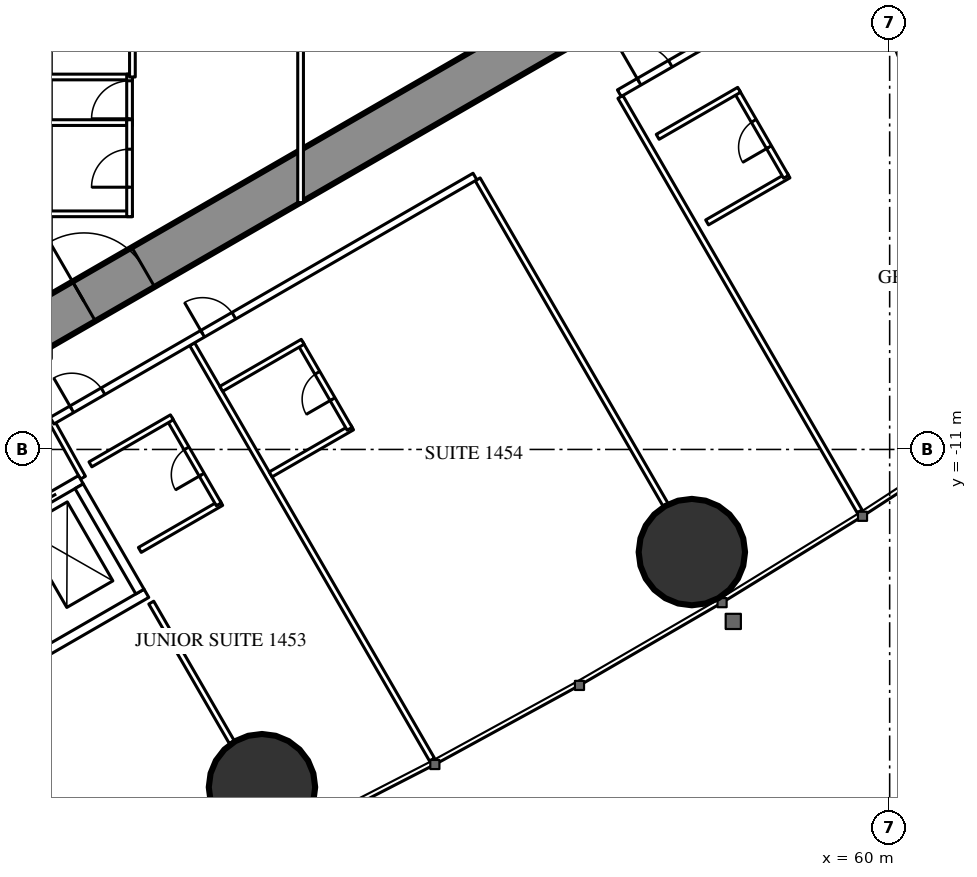
"""IFC4 building model, lengths in metres.
Left out: names, types, materials, properties, quantities, classifications, styles, units other than length and angle.
Written with IfcOpenShell. Run it as: python <this file> out.ifc"""

import sys

from ifc_helpers import new_model, si_unit, direction, frame, frame_2d, origin, origin_2d, place, context, subcontext, project, spatial, rectangle, hollow_circle, extrude, element, fill, save


model = new_model("IFC4")
c1 = context("Model", 3, precision=1e-05, world=origin(), true_north=direction((0.0, 1.0)))
c2 = subcontext(c1, "Body", "Model", "MODEL_VIEW")
j1 = project(units=[si_unit("LENGTHUNIT", "METRE"), si_unit("PLANEANGLEUNIT", "RADIAN")], contexts=[c1])
p1 = place(None, origin())
s1 = spatial("IfcSite", under=j1, at=p1, CompositionType="ELEMENT")
p2 = place(p1, origin())
s2 = spatial("IfcBuilding", under=s1, at=p2, CompositionType="ELEMENT")
p3 = place(p2, frame((0.0, 0.0, 56.5)))
s3 = spatial("IfcBuildingStorey", under=s2, at=p3, CompositionType="ELEMENT", Elevation=56.5)
for number, where, z_axis, x_axis in (
    (1, (43.484, -19.886, 0.0), (0.0, 0.0, 1.0), (1.0, 0.0, 0.0)),
    (2, (54.795, -13.701, 0.0), (0.0, 0.0, 1.0), (1.0, 0.0, 0.0)),
):
    element("IfcColumn", number, at=place(p3, frame(where, z_axis=z_axis, x_axis=x_axis)), inside=s3, PredefinedType="COLUMN", context=c2, shape_type="SweptSolid", body=[
        extrude(hollow_circle(Radius=1.4, WallThickness=0.12, at=origin_2d()), origin(), (0.0, 0.0, 1.0), 3.5),
    ])
p4 = place(p3, frame((61.5, 0.0, 0.0), z_axis=(0.0, 0.0, 1.0), x_axis=(1.0, 0.0, 0.0)))
e3 = element("IfcColumn", 3, at=p4, inside=s3, PredefinedType="COLUMN", context=c2, shape_type="SweptSolid", body=[
    extrude(hollow_circle(Radius=1.4, WallThickness=0.1, at=origin_2d()), origin(), (0.0, 0.0, 1.0), 3.5),
])
p5 = place(p3, frame((27.2, -13.8, 0.0), z_axis=(0.0, 0.0, 1.0), x_axis=(0.866027159892, 0.499996958321, 0.0)))
e4 = element("IfcWall", 4, at=p5, inside=s3, PredefinedType="SHEAR", context=c2, shape_type="SweptSolid", body=[
    extrude(rectangle(XDim=27.947, YDim=1.2, at=frame_2d((13.973, 0.0))), origin(), (0.0, 0.0, 1.0), 3.5),
])
p6 = place(p5, frame((4.6, 0.0, 0.0)))
e5 = element("IfcOpeningElement", 5, at=p6, cuts=e4, PredefinedType="OPENING", context=c2, shape_type="SweptSolid", body=[
    extrude(rectangle(XDim=1.0, YDim=2.2, at=frame_2d((0.5, 1.1))), frame((0.0, 0.61, 0.0), z_axis=(0.0, -1.0, 0.0), x_axis=(1.0, 0.0, 0.0)), (0.0, 0.0, 1.0), 1.22),
])
p7 = place(p5, frame((13.395, 0.0, 0.0)))
e6 = element("IfcOpeningElement", 6, at=p7, cuts=e4, PredefinedType="OPENING", context=c2, shape_type="SweptSolid", body=[
    extrude(rectangle(XDim=1.8, YDim=2.2, at=frame_2d((0.9, 1.1))), frame((0.0, 0.61, 0.0), z_axis=(0.0, -1.0, 0.0), x_axis=(1.0, 0.0, 0.0)), (0.0, 0.0, 1.0), 1.22),
])
p8 = place(p3, frame((41.647, -8.23, 0.0), z_axis=(0.0, 0.0, 1.0), x_axis=(0.49998590462, -0.866033541603, 0.0)))
e7 = element("IfcWall", 7, at=p8, inside=s3, PredefinedType="PARTITIONING", context=c2, shape_type="SweptSolid", body=[
    extrude(rectangle(XDim=12.621, YDim=0.15, at=frame_2d((6.311, 0.0))), origin(), (0.0, 0.0, 1.0), 3.25),
])
p9 = place(p3, frame((49.159, -3.893, 0.0), z_axis=(0.0, 0.0, 1.0), x_axis=(0.499998773722, -0.866026111775, 0.0)))
e8 = element("IfcWall", 8, at=p9, inside=s3, PredefinedType="PARTITIONING", context=c2, shape_type="SweptSolid", body=[
    extrude(rectangle(XDim=9.892, YDim=0.15, at=frame_2d((4.946, 0.0))), origin(), (0.0, 0.0, 1.0), 2.25),
])
p10 = place(p3, frame((52.915, -1.725, 0.0), z_axis=(0.0, 0.0, 1.0), x_axis=(0.499997163113, -0.866027041656, 0.0)))
e9 = element("IfcWall", 9, at=p10, inside=s3, PredefinedType="PARTITIONING", context=c2, shape_type="SweptSolid", body=[
    extrude(rectangle(XDim=12.591, YDim=0.15, at=frame_2d((6.295, 0.0))), origin(), (0.0, 0.0, 1.0), 3.25),
])
p11 = place(p3, frame((40.57, -15.03, 0.0), z_axis=(0.0, 0.0, 1.0), x_axis=(0.500012993597, -0.866017901798, 0.0)))
e10 = element("IfcWall", 10, at=p11, inside=s3, PredefinedType="PARTITIONING", context=c2, shape_type="SweptSolid", body=[
    extrude(rectangle(XDim=4.243, YDim=0.15, at=frame_2d((2.122, 0.0))), origin(), (0.0, 0.0, 1.0), 3.25),
])
p12 = place(p3, frame((38.773, -11.742, 0.0), z_axis=(0.0, 0.0, 1.0), x_axis=(-0.485528096672, 0.8742210632, 0.0)))
e11 = element("IfcWall", 11, at=p12, inside=s3, PredefinedType="PARTITIONING", context=c2, shape_type="SweptSolid", body=[
    extrude(rectangle(XDim=1.805, YDim=0.15, at=frame_2d((0.903, 0.0))), origin(), (0.0, 0.0, 1.0), 3.25),
])
p13 = place(p3, frame((37.96, -10.243, 0.0), z_axis=(0.0, 0.0, 1.0), x_axis=(0.866030548046, 0.499991089772, 0.0)))
e12 = element("IfcWall", 12, at=p13, inside=s3, PredefinedType="PARTITIONING", context=c2, shape_type="SweptSolid", body=[
    extrude(rectangle(XDim=12.849, YDim=0.2, at=frame_2d((6.425, 0.0))), origin(), (0.0, 0.0, 1.0), 3.25),
])
p14 = place(p13, frame((4.575, 0.0, 0.0)))
e13 = element("IfcOpeningElement", 13, at=p14, cuts=e12, PredefinedType="OPENING", context=c2, shape_type="SweptSolid", body=[
    extrude(rectangle(XDim=0.95, YDim=2.2, at=frame_2d((0.475, 1.1))), frame((0.0, 0.11, 0.0), z_axis=(0.0, -1.0, 0.0), x_axis=(1.0, 0.0, 0.0)), (0.0, 0.0, 1.0), 0.22),
])
p15 = place(p13, frame((0.6, 0.0, 0.0)))
e14 = element("IfcOpeningElement", 14, at=p15, cuts=e12, PredefinedType="OPENING", context=c2, shape_type="SweptSolid", body=[
    extrude(rectangle(XDim=0.95, YDim=2.2, at=frame_2d((0.475, 1.1))), frame((0.0, 0.11, 0.0), z_axis=(0.0, -1.0, 0.0), x_axis=(1.0, 0.0, 0.0)), (0.0, 0.0, 1.0), 0.22),
])
p16 = place(p3, frame((52.886, -1.626, 0.0), z_axis=(0.0, 0.0, 1.0), x_axis=(0.866030540913, 0.499991102127, 0.0)))
e15 = element("IfcWall", 15, at=p16, inside=s3, PredefinedType="PARTITIONING", context=c2, shape_type="SweptSolid", body=[
    extrude(rectangle(XDim=3.251, YDim=0.2, at=frame_2d((1.626, 0.0))), origin(), (0.0, 0.0, 1.0), 3.25),
])
p17 = place(p16, frame((0.6, 0.0, 0.0)))
e16 = element("IfcOpeningElement", 16, at=p17, cuts=e15, PredefinedType="OPENING", context=c2, shape_type="SweptSolid", body=[
    extrude(rectangle(XDim=0.95, YDim=2.2, at=frame_2d((0.475, 1.1))), frame((0.0, 0.11, 0.0), z_axis=(0.0, -1.0, 0.0), x_axis=(1.0, 0.0, 0.0)), (0.0, 0.0, 1.0), 0.22),
])
p18 = place(p3, frame((43.712, -11.657, 0.0), z_axis=(0.0, 0.0, 1.0), x_axis=(0.866006523861, 0.500032699561, 0.0)))
e17 = element("IfcWall", 17, at=p18, inside=s3, PredefinedType="PARTITIONING", context=c2, shape_type="SweptSolid", body=[
    extrude(rectangle(XDim=2.475, YDim=0.15, at=frame_2d((1.237, 0.0))), origin(), (0.0, 0.0, 1.0), 3.25),
])
p19 = place(p3, frame((44.491, -8.205, 0.0), z_axis=(0.0, 0.0, 1.0), x_axis=(0.500047596559, -0.865997922154, 0.0)))
e18 = element("IfcWall", 18, at=p19, inside=s3, PredefinedType="PARTITIONING", context=c2, shape_type="SweptSolid", body=[
    extrude(rectangle(XDim=2.6, YDim=0.15, at=frame_2d((1.3, 0.0))), origin(), (0.0, 0.0, 1.0), 3.25),
])
p20 = place(p19, frame((0.9, 0.0, 0.0)))
e19 = element("IfcOpeningElement", 19, at=p20, cuts=e18, PredefinedType="OPENING", context=c2, shape_type="SweptSolid", body=[
    extrude(rectangle(XDim=0.8, YDim=2.2, at=frame_2d((0.4, 1.1))), frame((0.0, 0.085, 0.0), z_axis=(0.0, -1.0, 0.0), x_axis=(1.0, 0.0, 0.0)), (0.0, 0.0, 1.0), 0.17),
])
p21 = place(p3, frame((42.412, -9.405, 0.0), z_axis=(0.0, 0.0, 1.0), x_axis=(0.866006523861, 0.500032699561, 0.0)))
e20 = element("IfcWall", 20, at=p21, inside=s3, PredefinedType="PARTITIONING", context=c2, shape_type="SweptSolid", body=[
    extrude(rectangle(XDim=2.475, YDim=0.15, at=frame_2d((1.237, 0.0))), origin(), (0.0, 0.0, 1.0), 3.25),
])
p22 = place(p3, frame((55.196, -5.026, 0.0), z_axis=(0.0, 0.0, 1.0), x_axis=(0.866073894602, 0.499916002032, 0.0)))
e21 = element("IfcWall", 21, at=p22, inside=s3, PredefinedType="PARTITIONING", context=c2, shape_type="SweptSolid", body=[
    extrude(rectangle(XDim=2.475, YDim=0.15, at=frame_2d((1.238, 0.0))), origin(), (0.0, 0.0, 1.0), 3.25),
])
p23 = place(p3, frame((55.975, -1.575, 0.0), z_axis=(0.0, 0.0, 1.0), x_axis=(0.500006934395, -0.866021400173, 0.0)))
e22 = element("IfcWall", 22, at=p23, inside=s3, PredefinedType="PARTITIONING", context=c2, shape_type="SweptSolid", body=[
    extrude(rectangle(XDim=2.6, YDim=0.15, at=frame_2d((1.3, 0.0))), origin(), (0.0, 0.0, 1.0), 3.25),
])
p24 = place(p23, frame((0.9, 0.0, 0.0)))
e23 = element("IfcOpeningElement", 23, at=p24, cuts=e22, PredefinedType="OPENING", context=c2, shape_type="SweptSolid", body=[
    extrude(rectangle(XDim=0.8, YDim=2.2, at=frame_2d((0.4, 1.1))), frame((0.0, 0.085, 0.0), z_axis=(0.0, -1.0, 0.0), x_axis=(1.0, 0.0, 0.0)), (0.0, 0.0, 1.0), 0.17),
])
p25 = place(p3, frame((53.896, -2.775, 0.0), z_axis=(0.0, 0.0, 1.0), x_axis=(0.866006523861, 0.500032699561, 0.0)))
e24 = element("IfcWall", 24, at=p25, inside=s3, PredefinedType="PARTITIONING", context=c2, shape_type="SweptSolid", body=[
    extrude(rectangle(XDim=2.475, YDim=0.15, at=frame_2d((1.237, 0.0))), origin(), (0.0, 0.0, 1.0), 3.25),
])
p26 = place(p3, frame((40.27, -13.644, 0.0), z_axis=(0.0, 0.0, 1.0), x_axis=(0.866031185235, 0.4999899861, 0.0)))
e25 = element("IfcWall", 25, at=p26, inside=s3, PredefinedType="PARTITIONING", context=c2, shape_type="SweptSolid", body=[
    extrude(rectangle(XDim=2.475, YDim=0.15, at=frame_2d((1.238, 0.0))), origin(), (0.0, 0.0, 1.0), 3.25),
])
p27 = place(p3, frame((41.048, -10.193, 0.0), z_axis=(0.0, 0.0, 1.0), x_axis=(0.500047596559, -0.865997922154, 0.0)))
e26 = element("IfcWall", 26, at=p27, inside=s3, PredefinedType="PARTITIONING", context=c2, shape_type="SweptSolid", body=[
    extrude(rectangle(XDim=2.6, YDim=0.15, at=frame_2d((1.3, 0.0))), origin(), (0.0, 0.0, 1.0), 3.25),
])
p28 = place(p27, frame((0.9, 0.0, 0.0)))
e27 = element("IfcOpeningElement", 27, at=p28, cuts=e26, PredefinedType="OPENING", context=c2, shape_type="SweptSolid", body=[
    extrude(rectangle(XDim=0.8, YDim=2.2, at=frame_2d((0.4, 1.1))), frame((0.0, 0.085, 0.0), z_axis=(0.0, -1.0, 0.0), x_axis=(1.0, 0.0, 0.0)), (0.0, 0.0, 1.0), 0.17),
])
p29 = place(p3, frame((38.97, -11.393, 0.0), z_axis=(0.0, 0.0, 1.0), x_axis=(0.866031185235, 0.4999899861, 0.0)))
e28 = element("IfcWall", 28, at=p29, inside=s3, PredefinedType="PARTITIONING", context=c2, shape_type="SweptSolid", body=[
    extrude(rectangle(XDim=2.475, YDim=0.15, at=frame_2d((1.238, 0.0))), origin(), (0.0, 0.0, 1.0), 3.25),
])
for number, where, z_axis, x_axis in (
    (29, (37.9, -1.2, 0.0), (0.0, 0.0, 1.0), (1.0, 0.0, 0.0)),
    (30, (37.9, -2.4, 0.0), (0.0, 0.0, 1.0), (1.0, 0.0, 0.0)),
    (31, (37.9, -4.8, 0.0), (0.0, 0.0, 1.0), (1.0, 0.0, 0.0)),
):
    element("IfcWall", number, at=place(p3, frame(where, z_axis=z_axis, x_axis=x_axis)), inside=s3, PredefinedType="PARTITIONING", context=c2, shape_type="SweptSolid", body=[
        extrude(rectangle(XDim=2.175, YDim=0.15, at=frame_2d((1.087, 0.0))), origin(), (0.0, 0.0, 1.0), 3.25),
    ])
p30 = place(p3, frame((40.0, -2.475, 0.0), z_axis=(0.0, 0.0, 1.0), x_axis=(0.0, 1.0, 0.0)))
e32 = element("IfcWall", 32, at=p30, inside=s3, PredefinedType="PARTITIONING", context=c2, shape_type="SweptSolid", body=[
    extrude(rectangle(XDim=1.35, YDim=0.15, at=frame_2d((0.675, 0.0))), origin(), (0.0, 0.0, 1.0), 3.25),
])
p31 = place(p30, frame((0.175, 0.0, 0.0)))
e33 = element("IfcOpeningElement", 33, at=p31, cuts=e32, PredefinedType="OPENING", context=c2, shape_type="SweptSolid", body=[
    extrude(rectangle(XDim=1.0, YDim=2.2, at=frame_2d((0.5, 1.1))), frame((0.0, 0.085, 0.0), z_axis=(0.0, -1.0, 0.0), x_axis=(1.0, 0.0, 0.0)), (0.0, 0.0, 1.0), 0.17),
])
p32 = place(p3, frame((40.0, -4.875, 0.0), z_axis=(0.0, 0.0, 1.0), x_axis=(0.0, 1.0, 0.0)))
e34 = element("IfcWall", 34, at=p32, inside=s3, PredefinedType="PARTITIONING", context=c2, shape_type="SweptSolid", body=[
    extrude(rectangle(XDim=2.55, YDim=0.15, at=frame_2d((1.275, 0.0))), origin(), (0.0, 0.0, 1.0), 3.25),
])
p33 = place(p32, frame((0.775, 0.0, 0.0)))
e35 = element("IfcOpeningElement", 35, at=p33, cuts=e34, PredefinedType="OPENING", context=c2, shape_type="SweptSolid", body=[
    extrude(rectangle(XDim=1.0, YDim=2.2, at=frame_2d((0.5, 1.1))), frame((0.0, 0.085, 0.0), z_axis=(0.0, -1.0, 0.0), x_axis=(1.0, 0.0, 0.0)), (0.0, 0.0, 1.0), 0.17),
])
p34 = place(p3, frame((40.075, -1.2, 0.0), z_axis=(0.0, 0.0, 1.0), x_axis=(0.0, 1.0, 0.0)))
e36 = element("IfcWall", 36, at=p34, inside=s3, PredefinedType="PARTITIONING", context=c2, shape_type="SweptSolid", body=[
    extrude(rectangle(XDim=6.874, YDim=0.15, at=frame_2d((3.437, 0.0))), origin(), (0.0, 0.0, 1.0), 3.25),
])
p35 = place(p34, frame((2.537, 0.0, 0.0)))
e37 = element("IfcOpeningElement", 37, at=p35, cuts=e36, PredefinedType="OPENING", context=c2, shape_type="SweptSolid", body=[
    extrude(rectangle(XDim=1.8, YDim=2.2, at=frame_2d((0.9, 1.1))), frame((0.0, 0.085, 0.0), z_axis=(0.0, -1.0, 0.0), x_axis=(1.0, 0.0, 0.0)), (0.0, 0.0, 1.0), 0.17),
])
p36 = place(p3, frame((44.5, -4.505, 0.0), z_axis=(0.0, 0.0, 1.0), x_axis=(0.0, 1.0, 0.0)))
e38 = element("IfcWall", 38, at=p36, inside=s3, PredefinedType="PARTITIONING", context=c2, shape_type="SweptSolid", body=[
    extrude(rectangle(XDim=9.009, YDim=0.15, at=frame_2d((4.505, 0.0))), origin(), (0.0, 0.0, 1.0), 2.45),
])
p37 = place(p36, frame((4.005, 0.0, 0.0)))
e39 = element("IfcOpeningElement", 39, at=p37, cuts=e38, PredefinedType="OPENING", context=c2, shape_type="SweptSolid", body=[
    extrude(rectangle(XDim=1.0, YDim=2.2, at=frame_2d((0.5, 1.1))), frame((0.0, 0.085, 0.0), z_axis=(0.0, -1.0, 0.0), x_axis=(1.0, 0.0, 0.0)), (0.0, 0.0, 1.0), 0.17),
])
p38 = place(p3, frame((31.271, -16.097, 0.0), z_axis=(0.0, 0.0, 1.0), x_axis=(0.86604045752, 0.499973925258, 0.0)))
e40 = element("IfcWall", 40, at=p38, inside=s3, PredefinedType="PARTITIONING", context=c2, shape_type="SweptSolid", body=[
    extrude(rectangle(XDim=8.6, YDim=0.25, at=frame_2d((4.3, 0.0))), origin(), (0.0, 0.0, 1.0), 3.25),
])
p39 = place(p38, frame((0.75, 0.0, 0.0)))
e41 = element("IfcOpeningElement", 41, at=p39, cuts=e40, PredefinedType="OPENING", context=c2, shape_type="SweptSolid", body=[
    extrude(rectangle(XDim=1.1, YDim=2.2, at=frame_2d((0.55, 1.1))), frame((0.0, 0.135, 0.0), z_axis=(0.0, -1.0, 0.0), x_axis=(1.0, 0.0, 0.0)), (0.0, 0.0, 1.0), 0.27),
])
p40 = place(p38, frame((2.75, 0.0, 0.0)))
e42 = element("IfcOpeningElement", 42, at=p40, cuts=e40, PredefinedType="OPENING", context=c2, shape_type="SweptSolid", body=[
    extrude(rectangle(XDim=1.1, YDim=2.2, at=frame_2d((0.55, 1.1))), frame((0.0, 0.135, 0.0), z_axis=(0.0, -1.0, 0.0), x_axis=(1.0, 0.0, 0.0)), (0.0, 0.0, 1.0), 0.27),
])
p41 = place(p38, frame((4.75, 0.0, 0.0)))
e43 = element("IfcOpeningElement", 43, at=p41, cuts=e40, PredefinedType="OPENING", context=c2, shape_type="SweptSolid", body=[
    extrude(rectangle(XDim=1.1, YDim=2.2, at=frame_2d((0.55, 1.1))), frame((0.0, 0.135, 0.0), z_axis=(0.0, -1.0, 0.0), x_axis=(1.0, 0.0, 0.0)), (0.0, 0.0, 1.0), 0.27),
])
p42 = place(p38, frame((6.75, 0.0, 0.0)))
e44 = element("IfcOpeningElement", 44, at=p42, cuts=e40, PredefinedType="OPENING", context=c2, shape_type="SweptSolid", body=[
    extrude(rectangle(XDim=1.1, YDim=2.2, at=frame_2d((0.55, 1.1))), frame((0.0, 0.135, 0.0), z_axis=(0.0, -1.0, 0.0), x_axis=(1.0, 0.0, 0.0)), (0.0, 0.0, 1.0), 0.27),
])
p43 = place(p3, frame((32.996, -19.086, 0.0), z_axis=(0.0, 0.0, 1.0), x_axis=(0.866028165386, 0.499995216735, 0.0)))
e45 = element("IfcWall", 45, at=p43, inside=s3, PredefinedType="PARTITIONING", context=c2, shape_type="SweptSolid", body=[
    extrude(rectangle(XDim=8.6, YDim=0.25, at=frame_2d((4.3, 0.0))), origin(), (0.0, 0.0, 1.0), 3.25),
])
p44 = place(p3, frame((38.673, -11.968, 0.0), z_axis=(0.0, 0.0, 1.0), x_axis=(0.499929347863, -0.866066190972, 0.0)))
e46 = element("IfcWall", 46, at=p44, inside=s3, PredefinedType="PARTITIONING", context=c2, shape_type="SweptSolid", body=[
    extrude(rectangle(XDim=3.201, YDim=0.25, at=frame_2d((1.6, 0.0))), origin(), (0.0, 0.0, 1.0), 3.25),
])
p45 = place(p20, origin())
e47 = element("IfcDoor", 47, at=p45, inside=s3, OperationType="SINGLE_SWING_RIGHT", PredefinedType="DOOR", context=c2, shape_type="SweptSolid", body=[
    extrude(rectangle(XDim=0.8, YDim=2.2, at=frame_2d((0.4, 1.1))), frame((0.0, 0.025, 0.0), z_axis=(0.0, -1.0, 0.0), x_axis=(1.0, 0.0, 0.0)), (0.0, 0.0, 1.0), 0.05),
])
fill(e19, e47)
p46 = place(p14, origin())
e48 = element("IfcDoor", 48, at=p46, inside=s3, OperationType="SINGLE_SWING_LEFT", PredefinedType="DOOR", context=c2, shape_type="SweptSolid", body=[
    extrude(rectangle(XDim=0.95, YDim=2.2, at=frame_2d((0.475, 1.1))), frame((0.0, 0.025, 0.0), z_axis=(0.0, -1.0, 0.0), x_axis=(1.0, 0.0, 0.0)), (0.0, 0.0, 1.0), 0.05),
])
fill(e13, e48)
p47 = place(p24, origin())
e49 = element("IfcDoor", 49, at=p47, inside=s3, OperationType="SINGLE_SWING_RIGHT", PredefinedType="DOOR", context=c2, shape_type="SweptSolid", body=[
    extrude(rectangle(XDim=0.8, YDim=2.2, at=frame_2d((0.4, 1.1))), frame((0.0, 0.025, 0.0), z_axis=(0.0, -1.0, 0.0), x_axis=(1.0, 0.0, 0.0)), (0.0, 0.0, 1.0), 0.05),
])
fill(e23, e49)
p48 = place(p17, origin())
e50 = element("IfcDoor", 50, at=p48, inside=s3, OperationType="SINGLE_SWING_LEFT", PredefinedType="DOOR", context=c2, shape_type="SweptSolid", body=[
    extrude(rectangle(XDim=0.95, YDim=2.2, at=frame_2d((0.475, 1.1))), frame((0.0, 0.025, 0.0), z_axis=(0.0, -1.0, 0.0), x_axis=(1.0, 0.0, 0.0)), (0.0, 0.0, 1.0), 0.05),
])
fill(e16, e50)
p49 = place(p28, origin())
e51 = element("IfcDoor", 51, at=p49, inside=s3, OperationType="SINGLE_SWING_RIGHT", PredefinedType="DOOR", context=c2, shape_type="SweptSolid", body=[
    extrude(rectangle(XDim=0.8, YDim=2.2, at=frame_2d((0.4, 1.1))), frame((0.0, 0.025, 0.0), z_axis=(0.0, -1.0, 0.0), x_axis=(1.0, 0.0, 0.0)), (0.0, 0.0, 1.0), 0.05),
])
fill(e27, e51)
p50 = place(p15, origin())
e52 = element("IfcDoor", 52, at=p50, inside=s3, OperationType="SINGLE_SWING_LEFT", PredefinedType="DOOR", context=c2, shape_type="SweptSolid", body=[
    extrude(rectangle(XDim=0.95, YDim=2.2, at=frame_2d((0.475, 1.1))), frame((0.0, 0.025, 0.0), z_axis=(0.0, -1.0, 0.0), x_axis=(1.0, 0.0, 0.0)), (0.0, 0.0, 1.0), 0.05),
])
fill(e14, e52)
p51 = place(p31, origin())
e53 = element("IfcDoor", 53, at=p51, inside=s3, OperationType="SINGLE_SWING_LEFT", PredefinedType="DOOR", context=c2, shape_type="SweptSolid", body=[
    extrude(rectangle(XDim=1.0, YDim=2.2, at=frame_2d((0.5, 1.1))), frame((0.0, 0.025, 0.0), z_axis=(0.0, -1.0, 0.0), x_axis=(1.0, 0.0, 0.0)), (0.0, 0.0, 1.0), 0.05),
])
fill(e33, e53)
p52 = place(p33, origin())
e54 = element("IfcDoor", 54, at=p52, inside=s3, OperationType="SINGLE_SWING_LEFT", PredefinedType="DOOR", context=c2, shape_type="SweptSolid", body=[
    extrude(rectangle(XDim=1.0, YDim=2.2, at=frame_2d((0.5, 1.1))), frame((0.0, 0.025, 0.0), z_axis=(0.0, -1.0, 0.0), x_axis=(1.0, 0.0, 0.0)), (0.0, 0.0, 1.0), 0.05),
])
fill(e35, e54)
p53 = place(p7, origin())
e55 = element("IfcDoor", 55, at=p53, inside=s3, OperationType="DOUBLE_DOOR_SINGLE_SWING", PredefinedType="DOOR", context=c2, shape_type="SweptSolid", body=[
    extrude(rectangle(XDim=1.8, YDim=2.2, at=frame_2d((0.9, 1.1))), frame((0.0, 0.025, 0.0), z_axis=(0.0, -1.0, 0.0), x_axis=(1.0, 0.0, 0.0)), (0.0, 0.0, 1.0), 0.05),
])
fill(e6, e55)
p54 = place(p42, origin())
e56 = element("IfcDoor", 56, at=p54, inside=s3, OperationType="DOUBLE_DOOR_SLIDING", PredefinedType="USERDEFINED", context=c2, shape_type="SweptSolid", body=[
    extrude(rectangle(XDim=1.1, YDim=2.2, at=frame_2d((0.55, 1.1))), frame((0.0, 0.025, 0.0), z_axis=(0.0, -1.0, 0.0), x_axis=(1.0, 0.0, 0.0)), (0.0, 0.0, 1.0), 0.05),
])
fill(e44, e56)
save(model, sys.argv[1])
